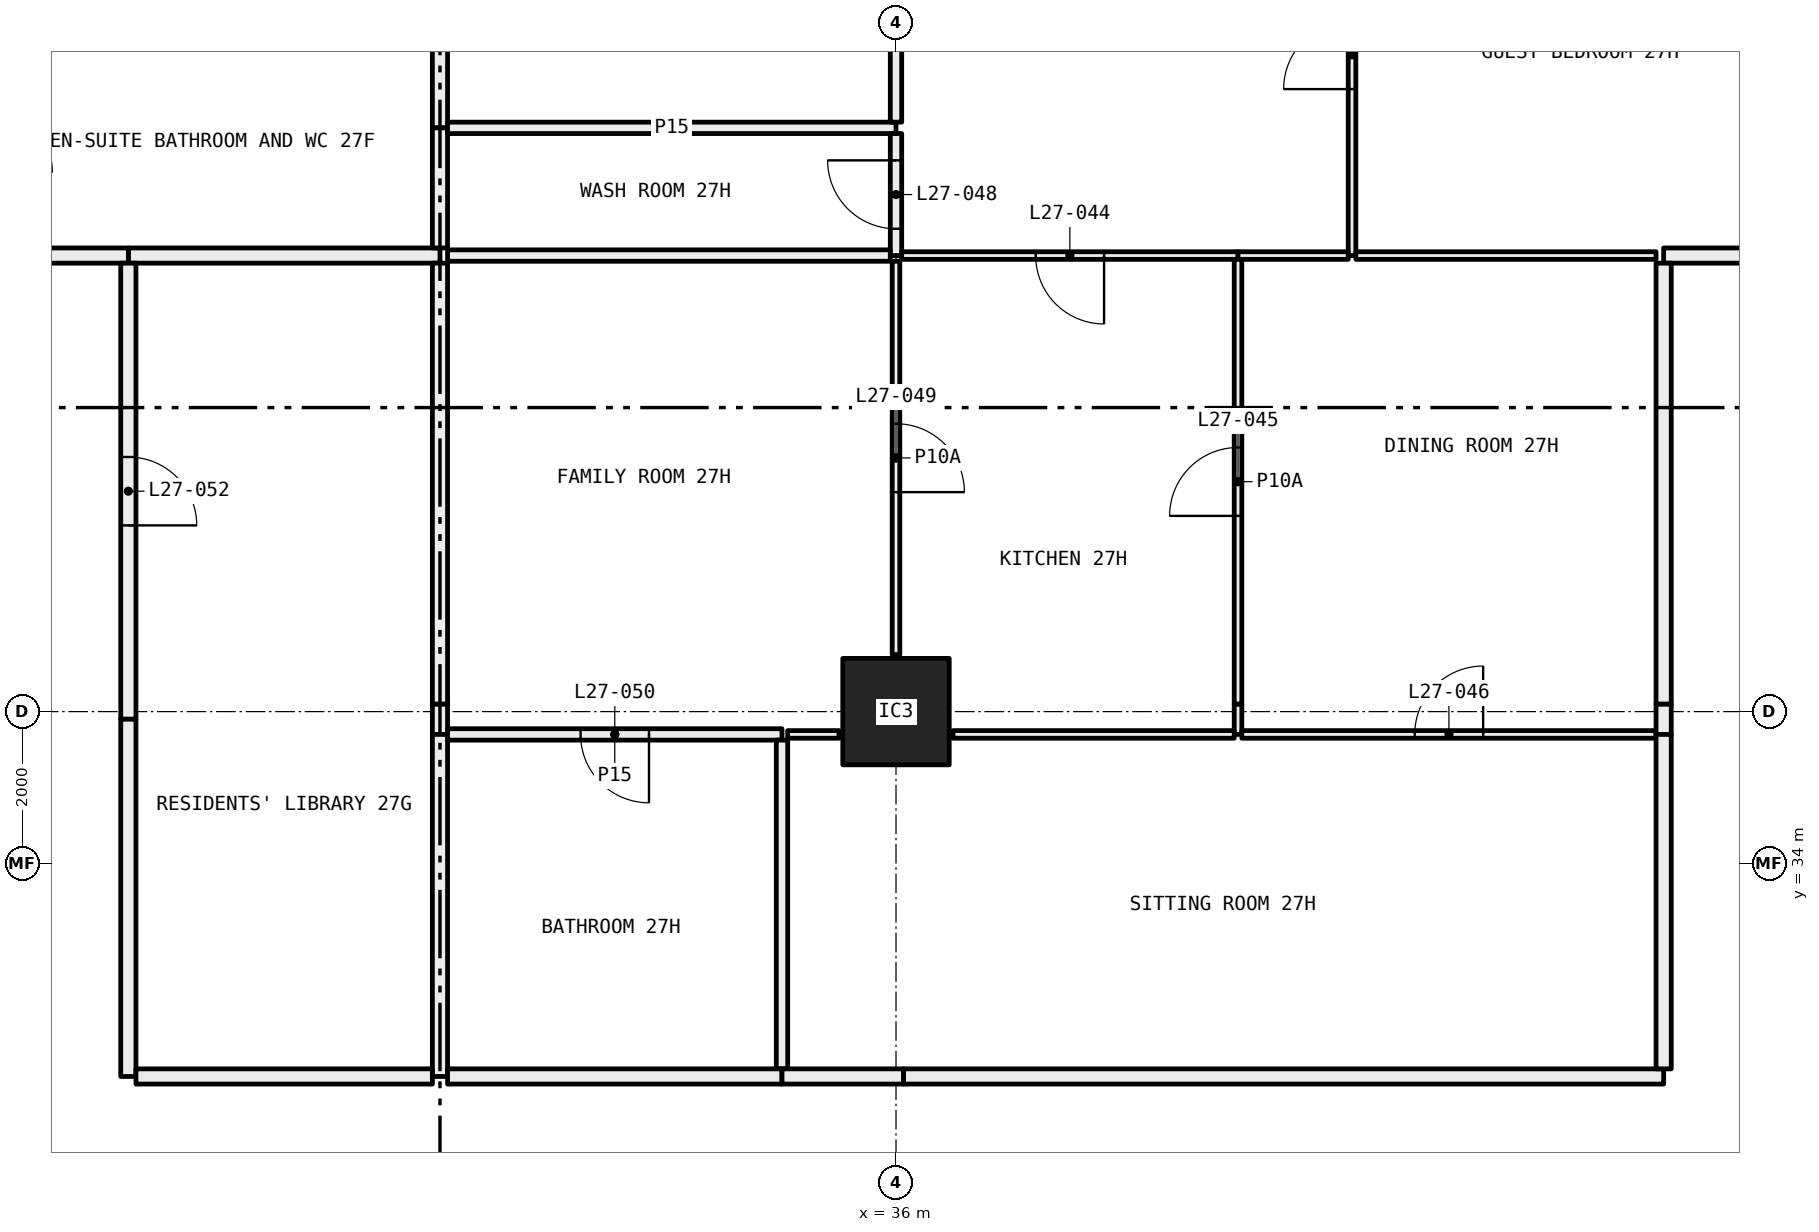
"""IFC4 building model, lengths in metres.
Left out: names, types, materials, properties, quantities, classifications, styles, units other than length and angle.
Written with IfcOpenShell. Run it as: python <this file> out.ifc"""

import sys

from ifc_helpers import new_model, si_unit, direction, frame, frame_2d, origin, origin_2d, place, context, subcontext, project, spatial, rectangle, hollow_rectangle, extrude, element, fill, save


model = new_model("IFC4")
c1 = context("Model", 3, precision=1e-05, world=origin(), true_north=direction((0.0, 1.0)))
c2 = subcontext(c1, "Body", "Model", "MODEL_VIEW")
j1 = project(units=[si_unit("LENGTHUNIT", "METRE"), si_unit("PLANEANGLEUNIT", "RADIAN")], contexts=[c1])
p1 = place(None, origin())
s1 = spatial("IfcSite", under=j1, at=p1, CompositionType="ELEMENT")
p2 = place(p1, origin())
s2 = spatial("IfcBuilding", under=s1, at=p2, CompositionType="ELEMENT")
p3 = place(p2, frame((0.0, 0.0, 106.95)))
s3 = spatial("IfcBuildingStorey", under=s2, at=p3, CompositionType="ELEMENT", Elevation=106.95)
p4 = place(p3, frame((36.0, 36.0, 0.0), z_axis=(0.0, 0.0, 1.0), x_axis=(1.0, 0.0, 0.0)))
e1 = element("IfcColumn", 1, at=p4, inside=s3, PredefinedType="COLUMN", context=c2, shape_type="SweptSolid", body=[
    extrude(hollow_rectangle(XDim=1.4, YDim=1.4, WallThickness=0.06, at=origin_2d()), origin(), (0.0, 0.0, 1.0), 3.05),
])
p5 = place(p3, frame((25.9, 42.0, 0.0), z_axis=(0.0, 0.0, 1.0), x_axis=(1.0, 0.0, 0.0)))
e2 = element("IfcWall", 2, at=p5, inside=s3, PredefinedType="PARTITIONING", context=c2, shape_type="SweptSolid", body=[
    extrude(rectangle(XDim=4.1, YDim=0.2, at=frame_2d((2.05, 0.0))), origin(), (0.0, 0.0, 1.0), 3.05),
])
p6 = place(p3, frame((30.0, 43.68, 0.0), z_axis=(0.0, 0.0, 1.0), x_axis=(0.0, 1.0, 0.0)))
e3 = element("IfcWall", 3, at=p6, inside=s3, PredefinedType="PARTITIONING", context=c2, shape_type="SweptSolid", body=[
    extrude(rectangle(XDim=1.32, YDim=0.2, at=frame_2d((0.66, 0.0))), origin(), (0.0, 0.0, 1.0), 3.05),
])
p7 = place(p3, frame((30.0, 42.1, 0.0), z_axis=(0.0, 0.0, 1.0), x_axis=(0.0, 1.0, 0.0)))
e4 = element("IfcWall", 4, at=p7, inside=s3, PredefinedType="PARTITIONING", context=c2, shape_type="SweptSolid", body=[
    extrude(rectangle(XDim=1.58, YDim=0.2, at=frame_2d((0.79, 0.0))), origin(), (0.0, 0.0, 1.0), 3.05),
])
p8 = place(p3, frame((24.0, 42.0, 0.0), z_axis=(0.0, 0.0, 1.0), x_axis=(1.0, 0.0, 0.0)))
e5 = element("IfcWall", 5, at=p8, inside=s3, PredefinedType="PARTITIONING", context=c2, shape_type="SweptSolid", body=[
    extrude(rectangle(XDim=1.9, YDim=0.2, at=frame_2d((0.95, 0.0))), origin(), (0.0, 0.0, 1.0), 3.05),
])
p9 = place(p3, frame((30.0, 35.7, 0.0), z_axis=(0.0, 0.0, 1.0), x_axis=(0.0, 1.0, 0.0)))
e6 = element("IfcWall", 6, at=p9, inside=s3, PredefinedType="PARTITIONING", context=c2, shape_type="SweptSolid", body=[
    extrude(rectangle(XDim=0.4, YDim=0.2, at=frame_2d((0.2, 0.0))), origin(), (0.0, 0.0, 1.0), 2.45),
])
p10 = place(p3, frame((30.0, 36.1, 0.0), z_axis=(0.0, 0.0, 1.0), x_axis=(0.0, 1.0, 0.0)))
e7 = element("IfcWall", 7, at=p10, inside=s3, PredefinedType="PARTITIONING", context=c2, shape_type="SweptSolid", body=[
    extrude(rectangle(XDim=5.8, YDim=0.2, at=frame_2d((2.9, 0.0))), origin(), (0.0, 0.0, 1.0), 3.05),
])
p11 = place(p3, frame((30.0, 31.2, 0.0), z_axis=(0.0, 0.0, 1.0), x_axis=(0.0, 1.0, 0.0)))
e8 = element("IfcWall", 8, at=p11, inside=s3, PredefinedType="PARTITIONING", context=c2, shape_type="SweptSolid", body=[
    extrude(rectangle(XDim=4.5, YDim=0.2, at=frame_2d((2.25, 0.0))), origin(), (0.0, 0.0, 1.0), 3.05),
])
p12 = place(p3, frame((25.9, 41.9, 0.0), z_axis=(0.0, 0.0, 1.0), x_axis=(0.0, -1.0, 0.0)))
e9 = element("IfcWall", 9, at=p12, inside=s3, PredefinedType="PARTITIONING", context=c2, shape_type="SweptSolid", body=[
    extrude(rectangle(XDim=6.0, YDim=0.2, at=frame_2d((3.0, 0.0))), origin(), (0.0, 0.0, 1.0), 2.45),
])
p13 = place(p12, frame((2.55, 0.0, 0.0)))
e10 = element("IfcOpeningElement", 10, at=p13, cuts=e9, PredefinedType="OPENING", context=c2, shape_type="SweptSolid", body=[
    extrude(rectangle(XDim=0.9, YDim=2.1, at=frame_2d((0.45, 1.05))), frame((0.0, 0.11, 0.0), z_axis=(0.0, -1.0, 0.0), x_axis=(1.0, 0.0, 0.0)), (0.0, 0.0, 1.0), 0.22),
])
p14 = place(p3, frame((25.9, 35.9, 0.0), z_axis=(0.0, 0.0, 1.0), x_axis=(0.0, -1.0, 0.0)))
e11 = element("IfcWall", 11, at=p14, inside=s3, PredefinedType="PARTITIONING", context=c2, shape_type="SweptSolid", body=[
    extrude(rectangle(XDim=4.7, YDim=0.2, at=frame_2d((2.35, 0.0))), origin(), (0.0, 0.0, 1.0), 3.05),
])
p15 = place(p3, frame((26.0, 31.2, 0.0), z_axis=(0.0, 0.0, 1.0), x_axis=(1.0, 0.0, 0.0)))
e12 = element("IfcWall", 12, at=p15, inside=s3, PredefinedType="PARTITIONING", context=c2, shape_type="SweptSolid", body=[
    extrude(rectangle(XDim=3.9, YDim=0.2, at=frame_2d((1.95, 0.0))), origin(), (0.0, 0.0, 1.0), 3.05),
])
p16 = place(p3, frame((30.1, 43.68, 0.0), z_axis=(0.0, 0.0, 1.0), x_axis=(1.0, 0.0, 0.0)))
e13 = element("IfcWall", 13, at=p16, inside=s3, PredefinedType="PARTITIONING", context=c2, shape_type="SweptSolid", body=[
    extrude(rectangle(XDim=5.9, YDim=0.15, at=frame_2d((2.95, 0.0))), origin(), (0.0, 0.0, 1.0), 2.45),
])
p17 = place(p3, frame((36.0, 43.755, 0.0), z_axis=(0.0, 0.0, 1.0), x_axis=(0.0, 1.0, 0.0)))
e14 = element("IfcWall", 14, at=p17, inside=s3, PredefinedType="PARTITIONING", context=c2, shape_type="SweptSolid", body=[
    extrude(rectangle(XDim=3.525, YDim=0.15, at=frame_2d((1.763, 0.0))), origin(), (0.0, 0.0, 1.0), 2.45),
])
p18 = place(p17, frame((1.312, 0.0, 0.0)))
e15 = element("IfcOpeningElement", 15, at=p18, cuts=e14, PredefinedType="OPENING", context=c2, shape_type="SweptSolid", body=[
    extrude(rectangle(XDim=0.9, YDim=2.1, at=frame_2d((0.45, 1.05))), frame((0.0, 0.085, 0.0), z_axis=(0.0, -1.0, 0.0), x_axis=(1.0, 0.0, 0.0)), (0.0, 0.0, 1.0), 0.17),
])
p19 = place(p3, frame((36.0, 42.0, 0.0), z_axis=(0.0, 0.0, 1.0), x_axis=(0.0, 1.0, 0.0)))
e16 = element("IfcWall", 16, at=p19, inside=s3, PredefinedType="PARTITIONING", context=c2, shape_type="SweptSolid", body=[
    extrude(rectangle(XDim=1.605, YDim=0.15, at=frame_2d((0.802, 0.0))), origin(), (0.0, 0.0, 1.0), 2.45),
])
p20 = place(p19, frame((0.353, 0.0, 0.0)))
e17 = element("IfcOpeningElement", 17, at=p20, cuts=e16, PredefinedType="OPENING", context=c2, shape_type="SweptSolid", body=[
    extrude(rectangle(XDim=0.9, YDim=2.1, at=frame_2d((0.45, 1.05))), frame((0.0, 0.085, 0.0), z_axis=(0.0, -1.0, 0.0), x_axis=(1.0, 0.0, 0.0)), (0.0, 0.0, 1.0), 0.17),
])
p21 = place(p3, frame((30.1, 42.0, 0.0), z_axis=(0.0, 0.0, 1.0), x_axis=(1.0, 0.0, 0.0)))
e18 = element("IfcWall", 18, at=p21, inside=s3, PredefinedType="PARTITIONING", context=c2, shape_type="SweptSolid", body=[
    extrude(rectangle(XDim=5.825, YDim=0.15, at=frame_2d((2.913, 0.0))), origin(), (0.0, 0.0, 1.0), 2.45),
])
p22 = place(p3, frame((42.0, 42.0, 0.0), z_axis=(0.0, 0.0, 1.0), x_axis=(0.0, 1.0, 0.0)))
e19 = element("IfcWall", 19, at=p22, inside=s3, PredefinedType="PARTITIONING", context=c2, shape_type="SweptSolid", body=[
    extrude(rectangle(XDim=5.28, YDim=0.1, at=frame_2d((2.64, 0.0))), origin(), (0.0, 0.0, 1.0), 3.05),
])
p23 = place(p22, frame((2.19, 0.0, 0.0)))
e20 = element("IfcOpeningElement", 20, at=p23, cuts=e19, PredefinedType="OPENING", context=c2, shape_type="SweptSolid", body=[
    extrude(rectangle(XDim=0.9, YDim=2.1, at=frame_2d((0.45, 1.05))), frame((0.0, 0.06, 0.0), z_axis=(0.0, -1.0, 0.0), x_axis=(1.0, 0.0, 0.0)), (0.0, 0.0, 1.0), 0.12),
])
p24 = place(p3, frame((36.075, 42.0, 0.0), z_axis=(0.0, 0.0, 1.0), x_axis=(1.0, 0.0, 0.0)))
e21 = element("IfcWall", 21, at=p24, inside=s3, PredefinedType="PARTITIONING", context=c2, shape_type="SweptSolid", body=[
    extrude(rectangle(XDim=4.425, YDim=0.1, at=frame_2d((2.212, 0.0))), origin(), (0.0, 0.0, 1.0), 2.45),
])
p25 = place(p24, frame((1.762, 0.0, 0.0)))
e22 = element("IfcOpeningElement", 22, at=p25, cuts=e21, PredefinedType="OPENING", context=c2, shape_type="SweptSolid", body=[
    extrude(rectangle(XDim=0.9, YDim=2.1, at=frame_2d((0.45, 1.05))), frame((0.0, 0.06, 0.0), z_axis=(0.0, -1.0, 0.0), x_axis=(1.0, 0.0, 0.0)), (0.0, 0.0, 1.0), 0.12),
])
p26 = place(p3, frame((40.5, 42.0, 0.0), z_axis=(0.0, 0.0, 1.0), x_axis=(1.0, 0.0, 0.0)))
e23 = element("IfcWall", 23, at=p26, inside=s3, PredefinedType="PARTITIONING", context=c2, shape_type="SweptSolid", body=[
    extrude(rectangle(XDim=1.45, YDim=0.1, at=frame_2d((0.725, 0.0))), origin(), (0.0, 0.0, 1.0), 3.05),
])
p27 = place(p3, frame((42.05, 42.0, 0.0), z_axis=(0.0, 0.0, 1.0), x_axis=(1.0, 0.0, 0.0)))
e24 = element("IfcWall", 24, at=p27, inside=s3, PredefinedType="PARTITIONING", context=c2, shape_type="SweptSolid", body=[
    extrude(rectangle(XDim=3.95, YDim=0.1, at=frame_2d((1.975, 0.0))), origin(), (0.0, 0.0, 1.0), 3.05),
])
p28 = place(p3, frame((46.1, 42.0, 0.0), z_axis=(0.0, 0.0, 1.0), x_axis=(1.0, 0.0, 0.0)))
e25 = element("IfcWall", 25, at=p28, inside=s3, PredefinedType="PARTITIONING", context=c2, shape_type="SweptSolid", body=[
    extrude(rectangle(XDim=1.9, YDim=0.2, at=frame_2d((0.95, 0.0))), origin(), (0.0, 0.0, 1.0), 3.05),
])
p29 = place(p3, frame((36.0, 36.75, 0.0), z_axis=(0.0, 0.0, 1.0), x_axis=(0.0, 1.0, 0.0)))
e26 = element("IfcWall", 26, at=p29, inside=s3, PredefinedType="PARTITIONING", context=c2, shape_type="SweptSolid", body=[
    extrude(rectangle(XDim=5.175, YDim=0.1, at=frame_2d((2.587, 0.0))), origin(), (0.0, 0.0, 1.0), 2.45),
])
p30 = place(p29, frame((2.137, 0.0, 0.0)))
e27 = element("IfcOpeningElement", 27, at=p30, cuts=e26, PredefinedType="OPENING", context=c2, shape_type="SweptSolid", body=[
    extrude(rectangle(XDim=0.9, YDim=2.1, at=frame_2d((0.45, 1.05))), frame((0.0, 0.06, 0.0), z_axis=(0.0, -1.0, 0.0), x_axis=(1.0, 0.0, 0.0)), (0.0, 0.0, 1.0), 0.12),
])
p31 = place(p3, frame((30.1, 35.7, 0.0), z_axis=(0.0, 0.0, 1.0), x_axis=(1.0, 0.0, 0.0)))
e28 = element("IfcWall", 28, at=p31, inside=s3, PredefinedType="PARTITIONING", context=c2, shape_type="SweptSolid", body=[
    extrude(rectangle(XDim=4.4, YDim=0.15, at=frame_2d((2.2, 0.0))), origin(), (0.0, 0.0, 1.0), 3.05),
])
p32 = place(p31, frame((1.75, 0.0, 0.0)))
e29 = element("IfcOpeningElement", 29, at=p32, cuts=e28, PredefinedType="OPENING", context=c2, shape_type="SweptSolid", body=[
    extrude(rectangle(XDim=0.9, YDim=2.1, at=frame_2d((0.45, 1.05))), frame((0.0, 0.085, 0.0), z_axis=(0.0, -1.0, 0.0), x_axis=(1.0, 0.0, 0.0)), (0.0, 0.0, 1.0), 0.17),
])
p33 = place(p3, frame((34.575, 35.7, 0.0), z_axis=(0.0, 0.0, 1.0), x_axis=(1.0, 0.0, 0.0)))
e30 = element("IfcWall", 30, at=p33, inside=s3, PredefinedType="PARTITIONING", context=c2, shape_type="SweptSolid", body=[
    extrude(rectangle(XDim=0.675, YDim=0.1, at=frame_2d((0.337, 0.0))), origin(), (0.0, 0.0, 1.0), 3.05),
])
p34 = place(p3, frame((40.5, 35.7, 0.0), z_axis=(0.0, 0.0, 1.0), x_axis=(0.0, 1.0, 0.0)))
e31 = element("IfcWall", 31, at=p34, inside=s3, PredefinedType="PARTITIONING", context=c2, shape_type="SweptSolid", body=[
    extrude(rectangle(XDim=0.4, YDim=0.1, at=frame_2d((0.2, 0.0))), origin(), (0.0, 0.0, 1.0), 2.45),
])
p35 = place(p3, frame((40.5, 36.1, 0.0), z_axis=(0.0, 0.0, 1.0), x_axis=(0.0, 1.0, 0.0)))
e32 = element("IfcWall", 32, at=p35, inside=s3, PredefinedType="PARTITIONING", context=c2, shape_type="SweptSolid", body=[
    extrude(rectangle(XDim=5.85, YDim=0.1, at=frame_2d((2.925, 0.0))), origin(), (0.0, 0.0, 1.0), 3.05),
])
p36 = place(p35, frame((2.475, 0.0, 0.0)))
e33 = element("IfcOpeningElement", 33, at=p36, cuts=e32, PredefinedType="OPENING", context=c2, shape_type="SweptSolid", body=[
    extrude(rectangle(XDim=0.9, YDim=2.1, at=frame_2d((0.45, 1.05))), frame((0.0, 0.06, 0.0), z_axis=(0.0, -1.0, 0.0), x_axis=(1.0, 0.0, 0.0)), (0.0, 0.0, 1.0), 0.12),
])
p37 = place(p3, frame((36.75, 35.7, 0.0), z_axis=(0.0, 0.0, 1.0), x_axis=(1.0, 0.0, 0.0)))
e34 = element("IfcWall", 34, at=p37, inside=s3, PredefinedType="PARTITIONING", context=c2, shape_type="SweptSolid", body=[
    extrude(rectangle(XDim=3.7, YDim=0.1, at=frame_2d((1.85, 0.0))), origin(), (0.0, 0.0, 1.0), 3.05),
])
p38 = place(p3, frame((40.55, 35.7, 0.0), z_axis=(0.0, 0.0, 1.0), x_axis=(1.0, 0.0, 0.0)))
e35 = element("IfcWall", 35, at=p38, inside=s3, PredefinedType="PARTITIONING", context=c2, shape_type="SweptSolid", body=[
    extrude(rectangle(XDim=5.45, YDim=0.1, at=frame_2d((2.725, 0.0))), origin(), (0.0, 0.0, 1.0), 3.05),
])
p39 = place(p38, frame((2.275, 0.0, 0.0)))
e36 = element("IfcOpeningElement", 36, at=p39, cuts=e35, PredefinedType="OPENING", context=c2, shape_type="SweptSolid", body=[
    extrude(rectangle(XDim=0.9, YDim=2.1, at=frame_2d((0.45, 1.05))), frame((0.0, 0.06, 0.0), z_axis=(0.0, -1.0, 0.0), x_axis=(1.0, 0.0, 0.0)), (0.0, 0.0, 1.0), 0.12),
])
p40 = place(p3, frame((46.1, 35.7, 0.0), z_axis=(0.0, 0.0, 1.0), x_axis=(0.0, 1.0, 0.0)))
e37 = element("IfcWall", 37, at=p40, inside=s3, PredefinedType="PARTITIONING", context=c2, shape_type="SweptSolid", body=[
    extrude(rectangle(XDim=0.4, YDim=0.2, at=frame_2d((0.2, 0.0))), origin(), (0.0, 0.0, 1.0), 2.45),
])
p41 = place(p3, frame((46.1, 36.1, 0.0), z_axis=(0.0, 0.0, 1.0), x_axis=(0.0, 1.0, 0.0)))
e38 = element("IfcWall", 38, at=p41, inside=s3, PredefinedType="PARTITIONING", context=c2, shape_type="SweptSolid", body=[
    extrude(rectangle(XDim=5.8, YDim=0.2, at=frame_2d((2.9, 0.0))), origin(), (0.0, 0.0, 1.0), 3.05),
])
p42 = place(p3, frame((34.5, 31.3, 0.0), z_axis=(0.0, 0.0, 1.0), x_axis=(0.0, 1.0, 0.0)))
e39 = element("IfcWall", 39, at=p42, inside=s3, PredefinedType="PARTITIONING", context=c2, shape_type="SweptSolid", body=[
    extrude(rectangle(XDim=4.325, YDim=0.15, at=frame_2d((2.163, 0.0))), origin(), (0.0, 0.0, 1.0), 3.05),
])
p43 = place(p3, frame((30.1, 31.2, 0.0), z_axis=(0.0, 0.0, 1.0), x_axis=(1.0, 0.0, 0.0)))
e40 = element("IfcWall", 40, at=p43, inside=s3, PredefinedType="PARTITIONING", context=c2, shape_type="SweptSolid", body=[
    extrude(rectangle(XDim=4.4, YDim=0.2, at=frame_2d((2.2, 0.0))), origin(), (0.0, 0.0, 1.0), 3.05),
])
p44 = place(p3, frame((34.5, 31.2, 0.0), z_axis=(0.0, 0.0, 1.0), x_axis=(1.0, 0.0, 0.0)))
e41 = element("IfcWall", 41, at=p44, inside=s3, PredefinedType="PARTITIONING", context=c2, shape_type="SweptSolid", body=[
    extrude(rectangle(XDim=1.6, YDim=0.2, at=frame_2d((0.8, 0.0))), origin(), (0.0, 0.0, 1.0), 2.45),
])
p45 = place(p3, frame((36.1, 31.2, 0.0), z_axis=(0.0, 0.0, 1.0), x_axis=(1.0, 0.0, 0.0)))
e42 = element("IfcWall", 42, at=p45, inside=s3, PredefinedType="PARTITIONING", context=c2, shape_type="SweptSolid", body=[
    extrude(rectangle(XDim=10.0, YDim=0.2, at=frame_2d((5.0, 0.0))), origin(), (0.0, 0.0, 1.0), 3.05),
])
p46 = place(p3, frame((46.1, 31.3, 0.0), z_axis=(0.0, 0.0, 1.0), x_axis=(0.0, 1.0, 0.0)))
e43 = element("IfcWall", 43, at=p46, inside=s3, PredefinedType="PARTITIONING", context=c2, shape_type="SweptSolid", body=[
    extrude(rectangle(XDim=4.4, YDim=0.2, at=frame_2d((2.2, 0.0))), origin(), (0.0, 0.0, 1.0), 3.05),
])
p47 = place(p23, origin())
e44 = element("IfcDoor", 44, at=p47, inside=s3, OperationType="SINGLE_SWING_RIGHT", PredefinedType="DOOR", context=c2, shape_type="SweptSolid", body=[
    extrude(rectangle(XDim=0.9, YDim=2.1, at=frame_2d((0.45, 1.05))), frame((0.0, 0.025, 0.0), z_axis=(0.0, -1.0, 0.0), x_axis=(1.0, 0.0, 0.0)), (0.0, 0.0, 1.0), 0.05),
])
fill(e20, e44)
p48 = place(p25, frame((0.9, 0.0, 0.0), x_axis=(-1.0, 0.0, 0.0)))
e45 = element("IfcDoor", 45, at=p48, inside=s3, OperationType="SINGLE_SWING_RIGHT", PredefinedType="DOOR", context=c2, shape_type="SweptSolid", body=[
    extrude(rectangle(XDim=0.9, YDim=2.1, at=frame_2d((0.45, 1.05))), frame((0.0, 0.025, 0.0), z_axis=(0.0, -1.0, 0.0), x_axis=(1.0, 0.0, 0.0)), (0.0, 0.0, 1.0), 0.05),
])
fill(e22, e45)
p49 = place(p36, origin())
e46 = element("IfcDoor", 46, at=p49, inside=s3, OperationType="SINGLE_SWING_RIGHT", PredefinedType="DOOR", context=c2, shape_type="SweptSolid", body=[
    extrude(rectangle(XDim=0.9, YDim=2.1, at=frame_2d((0.45, 1.05))), frame((0.0, 0.025, 0.0), z_axis=(0.0, -1.0, 0.0), x_axis=(1.0, 0.0, 0.0)), (0.0, 0.0, 1.0), 0.05),
])
fill(e33, e46)
p50 = place(p39, origin())
e47 = element("IfcDoor", 47, at=p50, inside=s3, OperationType="SINGLE_SWING_LEFT", PredefinedType="DOOR", context=c2, shape_type="SweptSolid", body=[
    extrude(rectangle(XDim=0.9, YDim=2.1, at=frame_2d((0.45, 1.05))), frame((0.0, 0.025, 0.0), z_axis=(0.0, -1.0, 0.0), x_axis=(1.0, 0.0, 0.0)), (0.0, 0.0, 1.0), 0.05),
])
fill(e36, e47)
p51 = place(p20, origin())
e48 = element("IfcDoor", 48, at=p51, inside=s3, OperationType="SINGLE_SWING_LEFT", PredefinedType="DOOR", context=c2, shape_type="SweptSolid", body=[
    extrude(rectangle(XDim=0.9, YDim=2.1, at=frame_2d((0.45, 1.05))), frame((0.0, 0.025, 0.0), z_axis=(0.0, -1.0, 0.0), x_axis=(1.0, 0.0, 0.0)), (0.0, 0.0, 1.0), 0.05),
])
fill(e17, e48)
p52 = place(p30, frame((0.9, 0.0, 0.0), x_axis=(-1.0, 0.0, 0.0)))
e49 = element("IfcDoor", 49, at=p52, inside=s3, OperationType="SINGLE_SWING_LEFT", PredefinedType="DOOR", context=c2, shape_type="SweptSolid", body=[
    extrude(rectangle(XDim=0.9, YDim=2.1, at=frame_2d((0.45, 1.05))), frame((0.0, 0.025, 0.0), z_axis=(0.0, -1.0, 0.0), x_axis=(1.0, 0.0, 0.0)), (0.0, 0.0, 1.0), 0.05),
])
fill(e27, e49)
p53 = place(p32, frame((0.9, 0.0, 0.0), x_axis=(-1.0, 0.0, 0.0)))
e50 = element("IfcDoor", 50, at=p53, inside=s3, OperationType="SINGLE_SWING_RIGHT", PredefinedType="DOOR", context=c2, shape_type="SweptSolid", body=[
    extrude(rectangle(XDim=0.9, YDim=2.1, at=frame_2d((0.45, 1.05))), frame((0.0, 0.025, 0.0), z_axis=(0.0, -1.0, 0.0), x_axis=(1.0, 0.0, 0.0)), (0.0, 0.0, 1.0), 0.05),
])
fill(e29, e50)
p54 = place(p13, origin())
e51 = element("IfcDoor", 51, at=p54, inside=s3, OperationType="SINGLE_SWING_LEFT", PredefinedType="DOOR", context=c2, shape_type="SweptSolid", body=[
    extrude(rectangle(XDim=0.9, YDim=2.1, at=frame_2d((0.45, 1.05))), frame((0.0, 0.025, 0.0), z_axis=(0.0, -1.0, 0.0), x_axis=(1.0, 0.0, 0.0)), (0.0, 0.0, 1.0), 0.05),
])
fill(e10, e51)
save(model, sys.argv[1])
